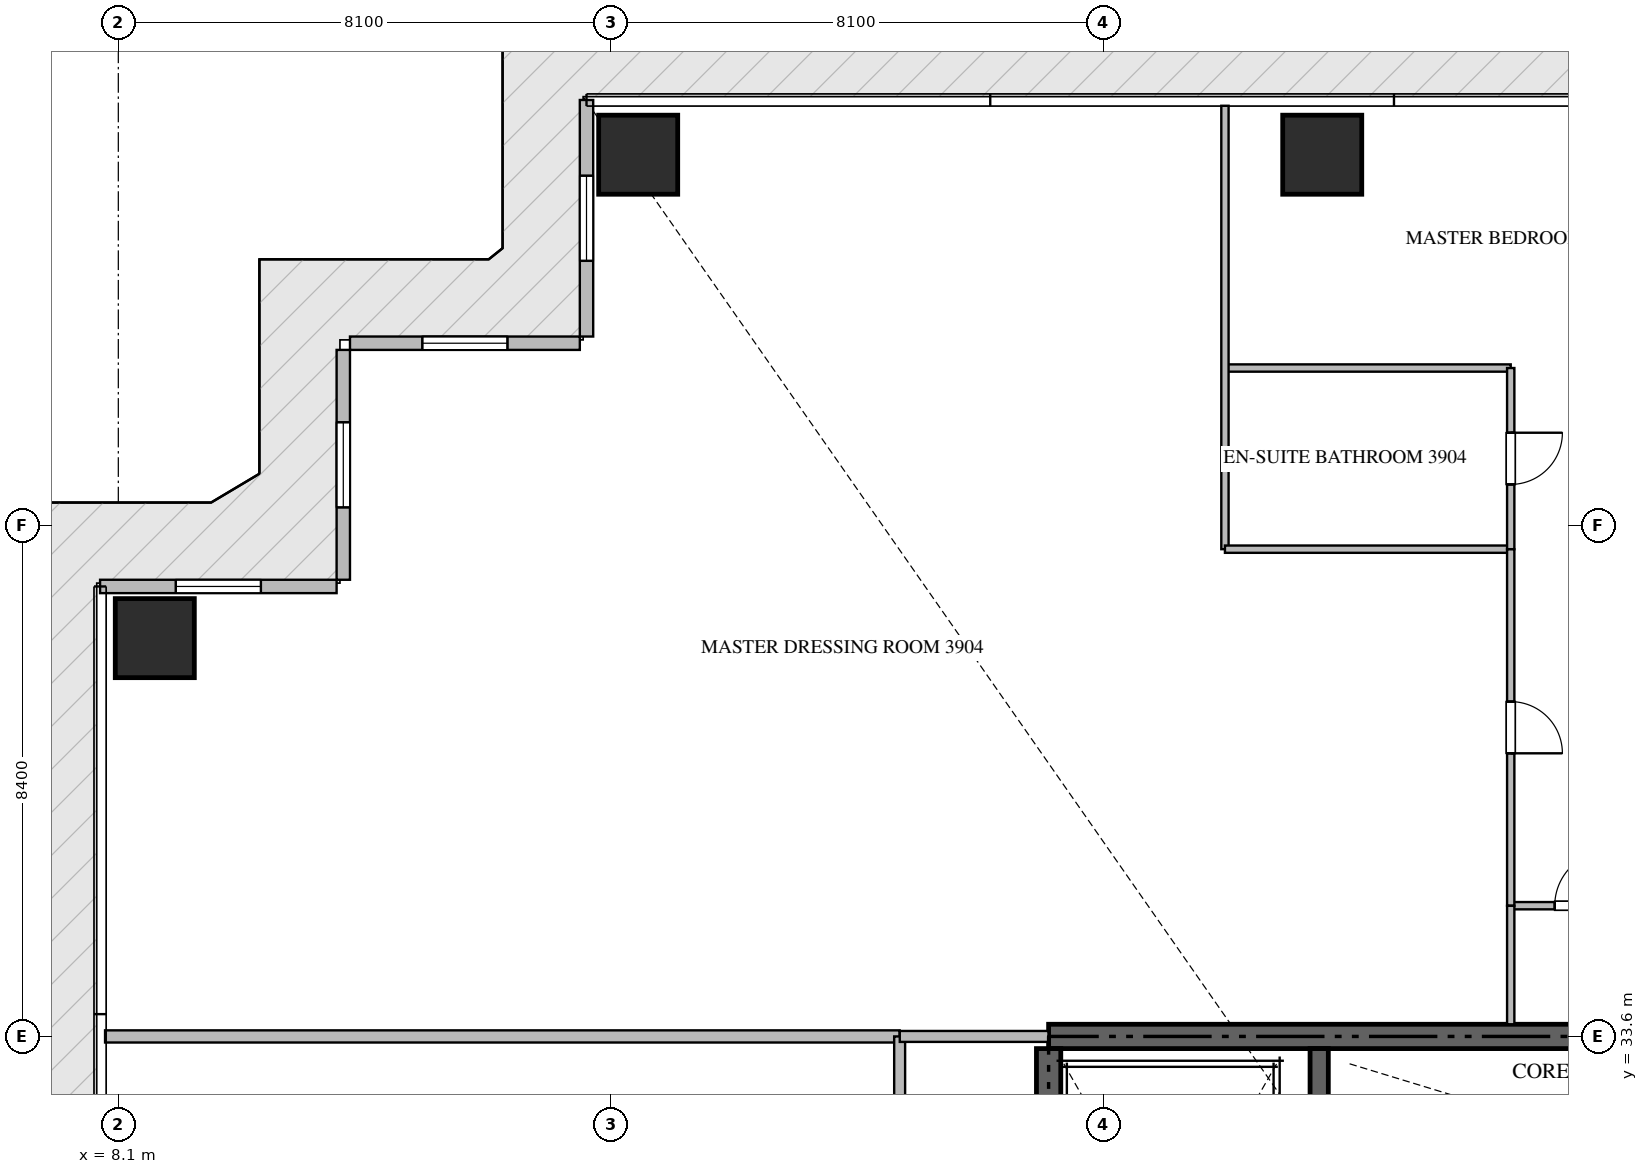
"""IFC4 building model, lengths in metres.
Left out: names, types, materials, properties, quantities, classifications, styles, units other than length and angle.
Written with IfcOpenShell. Run it as: python <this file> out.ifc"""

import sys

from ifc_helpers import new_model, si_unit, direction, frame, frame_2d, origin, origin_2d, place, context, subcontext, project, spatial, rectangle, extrude, source, transform, mapped, element, fill, save


model = new_model("IFC4")
c1 = context("Model", 3, precision=1e-05, world=origin(), true_north=direction((0.0, 1.0)))
c2 = subcontext(c1, "Body", "Model", "MODEL_VIEW")
j1 = project(units=[si_unit("LENGTHUNIT", "METRE"), si_unit("PLANEANGLEUNIT", "RADIAN")], contexts=[c1])
p1 = place(None, origin())
s1 = spatial("IfcSite", under=j1, at=p1, CompositionType="ELEMENT")
p2 = place(p1, origin())
s2 = spatial("IfcBuilding", under=s1, at=p2, CompositionType="ELEMENT")
p3 = place(p2, frame((0.0, 0.0, 157.65)))
s3 = spatial("IfcBuildingStorey", under=s2, at=p3, CompositionType="ELEMENT", Elevation=157.65)
p4 = place(p3, frame((41.4, 33.6, -0.26), z_axis=(0.0, 0.0, 1.0), x_axis=(-1.0, 0.0, 0.0)))
e1 = element("IfcWall", 1, at=p4, inside=s3, PredefinedType="SHEAR", context=c2, shape_type="SweptSolid", body=[
    extrude(rectangle(XDim=18.0, YDim=0.4, at=frame_2d((9.0, 0.0))), origin(), (0.0, 0.0, 1.0), 3.748),
])
p5 = place(p3, frame((23.4, 24.25, -0.26), z_axis=(0.0, 0.0, 1.0), x_axis=(0.0, 1.0, 0.0)))
e2 = element("IfcWall", 2, at=p5, inside=s3, PredefinedType="SHEAR", context=c2, shape_type="SweptSolid", body=[
    extrude(rectangle(XDim=9.15, YDim=0.4, at=frame_2d((4.575, 0.0))), origin(), (0.0, 0.0, 1.0), 3.748),
])
p6 = place(p3, frame((27.85, 23.55, -0.26), z_axis=(0.0, 0.0, 1.0), x_axis=(0.0, 1.0, 0.0)))
e3 = element("IfcWall", 3, at=p6, inside=s3, PredefinedType="SHEAR", context=c2, shape_type="SweptSolid", body=[
    extrude(rectangle(XDim=9.85, YDim=0.3, at=frame_2d((4.925, 0.0))), origin(), (0.0, 0.0, 1.0), 3.748),
])
m1 = source(origin(), c2, "Body", "SweptSolid", [
    extrude(rectangle(XDim=1.3, YDim=1.3, at=origin_2d()), origin(), (0.0, 0.0, 1.0), 3.75),
])
for number, where, z_axis, x_axis in (
    (4, (16.65, 48.1, -0.26), (0.0, 0.0, 1.0), (1.0, 0.0, 0.0)),
    (5, (27.9, 48.1, -0.26), (0.0, 0.0, 1.0), (1.0, 0.0, 0.0)),
    (6, (8.7, 40.15, -0.26), (0.0, 0.0, 1.0), (1.0, 0.0, 0.0)),
):
    element("IfcColumn", number, at=place(p3, frame(where, z_axis=z_axis, x_axis=x_axis)), inside=s3, PredefinedType="COLUMN", context=c2, shape_type="MappedRepresentation", body=[
        mapped(m1, transform((0.0, 0.0, 0.0), scale=1.0)),
    ])
p7 = place(p3, frame((15.8, 49.0, 0.0), z_axis=(0.0, 0.0, 1.0), x_axis=(0.0, -1.0, 0.0)))
e7 = element("IfcWall", 7, at=p7, inside=s3, PredefinedType="ELEMENTEDWALL", context=c2, shape_type="SweptSolid", body=[
    extrude(rectangle(XDim=3.89, YDim=0.22, at=frame_2d((1.945, 0.0))), origin(), (0.0, 0.0, 1.0), 3.475),
])
p8 = place(p7, frame((1.245, 0.0, 0.65)))
e8 = element("IfcOpeningElement", 8, at=p8, cuts=e7, PredefinedType="OPENING", context=c2, shape_type="SweptSolid", body=[
    extrude(rectangle(XDim=1.4, YDim=2.05, at=frame_2d((0.7, 1.025))), frame((0.0, 0.12, 0.0), z_axis=(0.0, -1.0, 0.0), x_axis=(1.0, 0.0, 0.0)), (0.0, 0.0, 1.0), 0.24),
])
p9 = place(p3, frame((15.69, 45.0, 0.0), z_axis=(0.0, 0.0, 1.0), x_axis=(-1.0, 0.0, 0.0)))
e9 = element("IfcWall", 9, at=p9, inside=s3, PredefinedType="ELEMENTEDWALL", context=c2, shape_type="SweptSolid", body=[
    extrude(rectangle(XDim=3.78, YDim=0.22, at=frame_2d((1.89, 0.0))), origin(), (0.0, 0.0, 1.0), 3.475),
])
p10 = place(p9, frame((1.19, 0.0, 0.65)))
e10 = element("IfcOpeningElement", 10, at=p10, cuts=e9, PredefinedType="OPENING", context=c2, shape_type="SweptSolid", body=[
    extrude(rectangle(XDim=1.4, YDim=2.05, at=frame_2d((0.7, 1.025))), frame((0.0, 0.12, 0.0), z_axis=(0.0, -1.0, 0.0), x_axis=(1.0, 0.0, 0.0)), (0.0, 0.0, 1.0), 0.24),
])
p11 = place(p3, frame((11.8, 44.89, 0.0), z_axis=(0.0, 0.0, 1.0), x_axis=(0.0, -1.0, 0.0)))
e11 = element("IfcWall", 11, at=p11, inside=s3, PredefinedType="ELEMENTEDWALL", context=c2, shape_type="SweptSolid", body=[
    extrude(rectangle(XDim=3.78, YDim=0.22, at=frame_2d((1.89, 0.0))), origin(), (0.0, 0.0, 1.0), 3.475),
])
p12 = place(p11, frame((1.19, 0.0, 0.65)))
e12 = element("IfcOpeningElement", 12, at=p12, cuts=e11, PredefinedType="OPENING", context=c2, shape_type="SweptSolid", body=[
    extrude(rectangle(XDim=1.4, YDim=2.05, at=frame_2d((0.7, 1.025))), frame((0.0, 0.12, 0.0), z_axis=(0.0, -1.0, 0.0), x_axis=(1.0, 0.0, 0.0)), (0.0, 0.0, 1.0), 0.24),
])
p13 = place(p3, frame((11.69, 41.0, 0.0), z_axis=(0.0, 0.0, 1.0), x_axis=(-1.0, 0.0, 0.0)))
e13 = element("IfcWall", 13, at=p13, inside=s3, PredefinedType="ELEMENTEDWALL", context=c2, shape_type="SweptSolid", body=[
    extrude(rectangle(XDim=3.89, YDim=0.22, at=frame_2d((1.945, 0.0))), origin(), (0.0, 0.0, 1.0), 3.475),
])
p14 = place(p13, frame((1.245, 0.0, 0.65)))
e14 = element("IfcOpeningElement", 14, at=p14, cuts=e13, PredefinedType="OPENING", context=c2, shape_type="SweptSolid", body=[
    extrude(rectangle(XDim=1.4, YDim=2.05, at=frame_2d((0.7, 1.025))), frame((0.0, 0.12, 0.0), z_axis=(0.0, -1.0, 0.0), x_axis=(1.0, 0.0, 0.0)), (0.0, 0.0, 1.0), 0.24),
])
p15 = place(p3, frame((7.882, 33.6, 0.0), z_axis=(0.0, 0.0, 1.0), x_axis=(1.0, 0.0, 0.0)))
e15 = element("IfcWall", 15, at=p15, inside=s3, PredefinedType="PARTITIONING", context=c2, shape_type="SweptSolid", body=[
    extrude(rectangle(XDim=13.068, YDim=0.2, at=frame_2d((6.534, 0.0))), origin(), (0.0, 0.0, 1.0), 3.49),
])
p16 = place(p3, frame((20.95, 14.9, 0.0), z_axis=(0.0, 0.0, 1.0), x_axis=(0.0, 1.0, 0.0)))
e16 = element("IfcWall", 16, at=p16, inside=s3, PredefinedType="PARTITIONING", context=c2, shape_type="SweptSolid", body=[
    extrude(rectangle(XDim=18.7, YDim=0.18, at=frame_2d((9.35, 0.0))), origin(), (0.0, 0.0, 1.0), 3.49),
])
p17 = place(p16, frame((14.603, 0.0, 0.0)))
e17 = element("IfcOpeningElement", 17, at=p17, cuts=e16, PredefinedType="OPENING", context=c2, shape_type="SweptSolid", body=[
    extrude(rectangle(XDim=1.0, YDim=2.15, at=frame_2d((0.5, 1.075))), frame((0.0, 0.1, 0.0), z_axis=(0.0, -1.0, 0.0), x_axis=(1.0, 0.0, 0.0)), (0.0, 0.0, 1.0), 0.2),
])
p18 = place(p3, frame((20.952, 33.6, 0.0), z_axis=(0.0, 0.0, 1.0), x_axis=(1.0, 0.0, 0.0)))
e18 = element("IfcWall", 18, at=p18, inside=s3, PredefinedType="PARTITIONING", context=c2, shape_type="SweptSolid", body=[
    extrude(rectangle(XDim=2.446, YDim=0.18, at=frame_2d((1.223, 0.0))), origin(), (0.0, 0.0, 1.0), 3.49),
])
p19 = place(p3, frame((31.0, 35.75, 0.0), z_axis=(0.0, 0.0, 1.0), x_axis=(1.0, 0.0, 0.0)))
e19 = element("IfcWall", 19, at=p19, inside=s3, PredefinedType="PARTITIONING", context=c2, shape_type="SweptSolid", body=[
    extrude(rectangle(XDim=2.348, YDim=0.12, at=frame_2d((1.174, 0.0))), origin(), (0.0, 0.0, 1.0), 3.49),
])
p20 = place(p19, frame((0.724, 0.0, 0.0)))
e20 = element("IfcOpeningElement", 20, at=p20, cuts=e19, PredefinedType="OPENING", context=c2, shape_type="SweptSolid", body=[
    extrude(rectangle(XDim=0.9, YDim=2.1, at=frame_2d((0.45, 1.05))), frame((0.0, 0.07, 0.0), z_axis=(0.0, -1.0, 0.0), x_axis=(1.0, 0.0, 0.0)), (0.0, 0.0, 1.0), 0.14),
])
p21 = place(p3, frame((26.3, 44.592, 0.0), z_axis=(0.0, 0.0, 1.0), x_axis=(1.0, 0.0, 0.0)))
e21 = element("IfcWall", 21, at=p21, inside=s3, PredefinedType="PARTITIONING", context=c2, shape_type="SweptSolid", body=[
    extrude(rectangle(XDim=4.7, YDim=0.12, at=frame_2d((2.35, 0.0))), origin(), (0.0, 0.0, 1.0), 3.49),
])
p22 = place(p3, frame((26.3, 48.905, 0.0), z_axis=(0.0, 0.0, 1.0), x_axis=(0.0, -1.0, 0.0)))
e22 = element("IfcWall", 22, at=p22, inside=s3, PredefinedType="PARTITIONING", context=c2, shape_type="SweptSolid", body=[
    extrude(rectangle(XDim=7.292, YDim=0.12, at=frame_2d((3.646, 0.0))), origin(), (0.0, 0.0, 1.0), 3.49),
])
p23 = place(p3, frame((26.3, 41.613, 0.0), z_axis=(0.0, 0.0, 1.0), x_axis=(1.0, 0.0, 0.0)))
e23 = element("IfcWall", 23, at=p23, inside=s3, PredefinedType="PARTITIONING", context=c2, shape_type="SweptSolid", body=[
    extrude(rectangle(XDim=4.7, YDim=0.12, at=frame_2d((2.35, 0.0))), origin(), (0.0, 0.0, 1.0), 3.49),
])
p24 = place(p3, frame((31.0, 44.592, 0.0), z_axis=(0.0, 0.0, 1.0), x_axis=(0.0, -1.0, 0.0)))
e24 = element("IfcWall", 24, at=p24, inside=s3, PredefinedType="PARTITIONING", context=c2, shape_type="SweptSolid", body=[
    extrude(rectangle(XDim=2.979, YDim=0.12, at=frame_2d((1.49, 0.0))), origin(), (0.0, 0.0, 1.0), 3.49),
])
p25 = place(p24, frame((1.064, 0.0, 0.0)))
e25 = element("IfcOpeningElement", 25, at=p25, cuts=e24, PredefinedType="OPENING", context=c2, shape_type="SweptSolid", body=[
    extrude(rectangle(XDim=0.85, YDim=2.1, at=frame_2d((0.425, 1.05))), frame((0.0, 0.07, 0.0), z_axis=(0.0, -1.0, 0.0), x_axis=(1.0, 0.0, 0.0)), (0.0, 0.0, 1.0), 0.14),
])
p26 = place(p3, frame((31.0, 41.611, 0.0), z_axis=(0.0, 0.0, 1.0), x_axis=(0.0, -1.0, 0.0)))
e26 = element("IfcWall", 26, at=p26, inside=s3, PredefinedType="PARTITIONING", context=c2, shape_type="SweptSolid", body=[
    extrude(rectangle(XDim=5.861, YDim=0.12, at=frame_2d((2.931, 0.0))), origin(), (0.0, 0.0, 1.0), 3.49),
])
p27 = place(p26, frame((2.505, 0.0, 0.0)))
e27 = element("IfcOpeningElement", 27, at=p27, cuts=e26, PredefinedType="OPENING", context=c2, shape_type="SweptSolid", body=[
    extrude(rectangle(XDim=0.85, YDim=2.1, at=frame_2d((0.425, 1.05))), frame((0.0, 0.07, 0.0), z_axis=(0.0, -1.0, 0.0), x_axis=(1.0, 0.0, 0.0)), (0.0, 0.0, 1.0), 0.14),
])
p28 = place(p3, frame((31.0, 35.748, 0.0), z_axis=(0.0, 0.0, 1.0), x_axis=(0.0, -1.0, 0.0)))
e28 = element("IfcWall", 28, at=p28, inside=s3, PredefinedType="PARTITIONING", context=c2, shape_type="SweptSolid", body=[
    extrude(rectangle(XDim=1.948, YDim=0.12, at=frame_2d((0.974, 0.0))), origin(), (0.0, 0.0, 1.0), 3.49),
])
m2 = source(origin(), c2, "Body", "SweptSolid", [
    extrude(rectangle(XDim=1.4, YDim=2.05, at=frame_2d((0.7, 1.025))), frame((0.0, 0.03, 0.0), z_axis=(0.0, -1.0, 0.0), x_axis=(1.0, 0.0, 0.0)), (0.0, 0.0, 1.0), 0.06),
])
p29 = place(p8, origin())
e29 = element("IfcWindow", 29, at=p29, inside=s3, PartitioningType="SINGLE_PANEL", PredefinedType="WINDOW", context=c2, shape_type="MappedRepresentation", body=[
    mapped(m2, transform((0.0, 0.0, 0.0), scale=1.0)),
])
fill(e8, e29)
p30 = place(p10, origin())
e30 = element("IfcWindow", 30, at=p30, inside=s3, PartitioningType="SINGLE_PANEL", PredefinedType="WINDOW", context=c2, shape_type="MappedRepresentation", body=[
    mapped(m2, transform((0.0, 0.0, 0.0), scale=1.0)),
])
fill(e10, e30)
p31 = place(p12, origin())
e31 = element("IfcWindow", 31, at=p31, inside=s3, PartitioningType="SINGLE_PANEL", PredefinedType="WINDOW", context=c2, shape_type="MappedRepresentation", body=[
    mapped(m2, transform((0.0, 0.0, 0.0), scale=1.0)),
])
fill(e12, e31)
p32 = place(p14, origin())
e32 = element("IfcWindow", 32, at=p32, inside=s3, PartitioningType="SINGLE_PANEL", PredefinedType="WINDOW", context=c2, shape_type="MappedRepresentation", body=[
    mapped(m2, transform((0.0, 0.0, 0.0), scale=1.0)),
])
fill(e14, e32)
m3 = source(origin(), c2, "Body", "SweptSolid", [
    extrude(rectangle(XDim=0.9, YDim=2.1, at=frame_2d((0.45, 1.05))), frame((0.0, 0.025, 0.0), z_axis=(0.0, -1.0, 0.0), x_axis=(1.0, 0.0, 0.0)), (0.0, 0.0, 1.0), 0.05),
])
p33 = place(p20, origin())
e33 = element("IfcDoor", 33, at=p33, inside=s3, OperationType="SINGLE_SWING_RIGHT", PredefinedType="DOOR", context=c2, shape_type="MappedRepresentation", body=[
    mapped(m3, transform((0.0, 0.0, 0.0), scale=1.0)),
])
fill(e20, e33)
m4 = source(origin(), c2, "Body", "SweptSolid", [
    extrude(rectangle(XDim=0.85, YDim=2.1, at=frame_2d((0.425, 1.05))), frame((0.0, 0.025, 0.0), z_axis=(0.0, -1.0, 0.0), x_axis=(1.0, 0.0, 0.0)), (0.0, 0.0, 1.0), 0.05),
])
p34 = place(p25, origin())
e34 = element("IfcDoor", 34, at=p34, inside=s3, OperationType="SINGLE_SWING_LEFT", PredefinedType="DOOR", context=c2, shape_type="MappedRepresentation", body=[
    mapped(m4, transform((0.0, 0.0, 0.0), scale=1.0)),
])
fill(e25, e34)
p35 = place(p27, origin())
e35 = element("IfcDoor", 35, at=p35, inside=s3, OperationType="SINGLE_SWING_RIGHT", PredefinedType="DOOR", context=c2, shape_type="MappedRepresentation", body=[
    mapped(m4, transform((0.0, 0.0, 0.0), scale=1.0)),
])
fill(e27, e35)
save(model, sys.argv[1])
